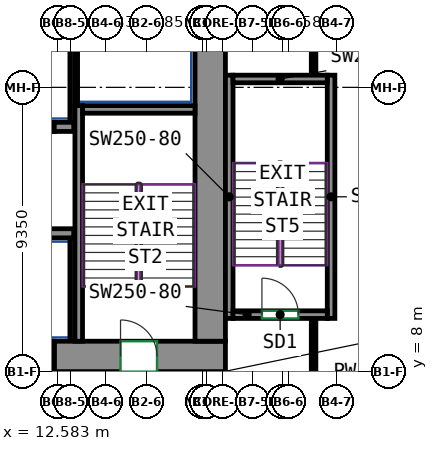
"""IFC4 building model, lengths in metres.
Left out: names, types, materials, properties, quantities, classifications, styles, units other than length and angle.
Written with IfcOpenShell. Run it as: python <this file> out.ifc"""

import sys

from ifc_helpers import new_model, si_unit, direction, frame, frame_2d, origin, place, context, subcontext, project, spatial, rectangle, extrude, source, transform, mapped, element, fill, save


model = new_model("IFC4")
c1 = context("Model", 3, precision=1e-05, world=origin(), true_north=direction((0.0, 1.0)))
c2 = subcontext(c1, "Body", "Model", "MODEL_VIEW")
j1 = project(units=[si_unit("LENGTHUNIT", "METRE"), si_unit("PLANEANGLEUNIT", "RADIAN")], contexts=[c1])
p1 = place(None, origin())
s1 = spatial("IfcSite", under=j1, at=p1, CompositionType="ELEMENT")
p2 = place(p1, origin())
s2 = spatial("IfcBuilding", under=s1, at=p2, CompositionType="ELEMENT")
p3 = place(p2, frame((0.0, 0.0, 13.5)))
s3 = spatial("IfcBuildingStorey", under=s2, at=p3, CompositionType="ELEMENT", Elevation=13.5)
m1 = source(origin(), c2, "Body", "SweptSolid", [
    extrude(rectangle(XDim=5.63, YDim=1.0, at=frame_2d((2.815, 0.0))), origin(), (0.0, 0.0, 1.0), 4.1),
])
p4 = place(p3, frame((12.47, 8.5, 0.0), z_axis=(0.0, 0.0, 1.0), x_axis=(1.0, 0.0, 0.0)))
e1 = element("IfcWall", 1, at=p4, inside=s3, PredefinedType="SHEAR", context=c2, shape_type="MappedRepresentation", body=[
    mapped(m1, transform((0.0, 0.0, 0.0))),
])
p5 = place(p4, frame((2.18, 0.0, 0.0)))
e2 = element("IfcOpeningElement", 2, at=p5, cuts=e1, PredefinedType="OPENING", context=c2, shape_type="SweptSolid", body=[
    extrude(rectangle(XDim=1.2, YDim=2.1, at=frame_2d((0.6, 1.05))), frame((0.0, 0.51, 0.0), z_axis=(0.0, -1.0, 0.0), x_axis=(1.0, 0.0, 0.0)), (0.0, 0.0, 1.0), 1.02),
])
m2 = source(origin(), c2, "Body", "SweptSolid", [
    extrude(rectangle(XDim=12.0, YDim=1.0, at=frame_2d((6.0, 0.0))), origin(), (0.0, 0.0, 1.0), 4.1),
])
p6 = place(p3, frame((17.6, 9.0, 0.0), z_axis=(0.0, 0.0, 1.0), x_axis=(0.0, 1.0, 0.0)))
e3 = element("IfcWall", 3, at=p6, inside=s3, PredefinedType="SHEAR", context=c2, shape_type="MappedRepresentation", body=[
    mapped(m2, transform((0.0, 0.0, 0.0))),
])
m3 = source(origin(), c2, "Body", "SweptSolid", [
    extrude(rectangle(XDim=7.75, YDim=0.25, at=frame_2d((3.875, 0.0))), origin(), (0.0, 0.0, 1.0), 4.1),
])
p7 = place(p3, frame((13.275, 9.0, 0.0), z_axis=(0.0, 0.0, 1.0), x_axis=(0.0, 1.0, 0.0)))
e4 = element("IfcWall", 4, at=p7, inside=s3, PredefinedType="SHEAR", context=c2, shape_type="MappedRepresentation", body=[
    mapped(m3, transform((0.0, 0.0, 0.0))),
])
m4 = source(origin(), c2, "Body", "SweptSolid", [
    extrude(rectangle(XDim=3.7, YDim=0.25, at=frame_2d((1.85, 0.0))), origin(), (0.0, 0.0, 1.0), 4.1),
])
p8 = place(p3, frame((13.4, 16.625, 0.0), z_axis=(0.0, 0.0, 1.0), x_axis=(1.0, 0.0, 0.0)))
e5 = element("IfcWall", 5, at=p8, inside=s3, PredefinedType="SHEAR", context=c2, shape_type="MappedRepresentation", body=[
    mapped(m4, transform((0.0, 0.0, 0.0))),
])
m5 = source(origin(), c2, "Body", "SweptSolid", [
    extrude(rectangle(XDim=8.0, YDim=0.25, at=frame_2d((4.0, 0.0))), origin(), (0.0, 0.0, 1.0), 4.1),
])
for number, where, z_axis, x_axis in (
    (6, (18.225, 9.75, 0.0), (0.0, 0.0, 1.0), (0.0, 1.0, 0.0)),
    (7, (21.575, 9.75, 0.0), (0.0, 0.0, 1.0), (0.0, 1.0, 0.0)),
):
    element("IfcWall", number, at=place(p3, frame(where, z_axis=z_axis, x_axis=x_axis)), inside=s3, PredefinedType="SHEAR", context=c2, shape_type="MappedRepresentation", body=[
        mapped(m5, transform((0.0, 0.0, 0.0))),
    ])
m6 = source(origin(), c2, "Body", "SweptSolid", [
    extrude(rectangle(XDim=3.1, YDim=0.25, at=frame_2d((1.55, 0.0))), origin(), (0.0, 0.0, 1.0), 4.1),
])
p9 = place(p3, frame((18.35, 9.875, 0.0), z_axis=(0.0, 0.0, 1.0), x_axis=(1.0, 0.0, 0.0)))
e8 = element("IfcWall", 8, at=p9, inside=s3, PredefinedType="SHEAR", context=c2, shape_type="MappedRepresentation", body=[
    mapped(m6, transform((0.0, 0.0, 0.0))),
])
p10 = place(p9, frame((0.95, 0.0, 0.0)))
e9 = element("IfcOpeningElement", 9, at=p10, cuts=e8, PredefinedType="OPENING", context=c2, shape_type="SweptSolid", body=[
    extrude(rectangle(XDim=1.2, YDim=2.1, at=frame_2d((0.6, 1.05))), frame((0.0, 0.135, 0.0), z_axis=(0.0, -1.0, 0.0), x_axis=(1.0, 0.0, 0.0)), (0.0, 0.0, 1.0), 0.27),
])
p11 = place(p3, frame((18.35, 17.625, 0.0), z_axis=(0.0, 0.0, 1.0), x_axis=(1.0, 0.0, 0.0)))
e10 = element("IfcWall", 10, at=p11, inside=s3, PredefinedType="SHEAR", context=c2, shape_type="MappedRepresentation", body=[
    mapped(m6, transform((0.0, 0.0, 0.0))),
])
m7 = source(origin(), c2, "Body", "SweptSolid", [
    extrude(rectangle(XDim=2.82, YDim=0.3, at=frame_2d((1.41, 0.0))), origin(), (0.0, 0.0, 1.0), 4.1),
])
p12 = place(p3, frame((10.29, 12.55, 0.0), z_axis=(0.0, 0.0, 1.0), x_axis=(1.0, 0.0, 0.0)))
e11 = element("IfcWall", 11, at=p12, inside=s3, PredefinedType="SHEAR", context=c2, shape_type="MappedRepresentation", body=[
    mapped(m7, transform((0.0, 0.0, 0.0))),
])
m8 = source(origin(), c2, "Body", "SweptSolid", [
    extrude(rectangle(XDim=0.64, YDim=0.3, at=frame_2d((0.32, 0.0))), origin(), (0.0, 0.0, 1.0), 4.1),
])
p13 = place(p3, frame((12.47, 16.05, 0.0), z_axis=(0.0, 0.0, 1.0), x_axis=(1.0, 0.0, 0.0)))
e12 = element("IfcWall", 12, at=p13, inside=s3, PredefinedType="SHEAR", context=c2, shape_type="MappedRepresentation", body=[
    mapped(m8, transform((0.0, 0.0, 0.0))),
])
m9 = source(origin(), c2, "Body", "SweptSolid", [
    extrude(rectangle(XDim=1.4, YDim=0.3, at=frame_2d((0.7, 0.0))), origin(), (0.0, 0.0, 1.0), 4.1),
])
p14 = place(p3, frame((11.07, 16.05, 0.0), z_axis=(0.0, 0.0, 1.0), x_axis=(1.0, 0.0, 0.0)))
e13 = element("IfcWall", 13, at=p14, inside=s3, PredefinedType="PARTITIONING", context=c2, shape_type="MappedRepresentation", body=[
    mapped(m9, transform((0.0, 0.0, 0.0))),
])
p15 = place(p14, frame((0.15, 0.0, 0.0)))
e14 = element("IfcOpeningElement", 14, at=p15, cuts=e13, PredefinedType="OPENING", context=c2, shape_type="SweptSolid", body=[
    extrude(rectangle(XDim=1.1, YDim=2.1, at=frame_2d((0.55, 1.05))), frame((0.0, 0.16, 0.0), z_axis=(0.0, -1.0, 0.0), x_axis=(1.0, 0.0, 0.0)), (0.0, 0.0, 1.0), 0.32),
])
m10 = source(origin(), c2, "Body", "SweptSolid", [
    extrude(rectangle(XDim=3.275, YDim=0.165, at=frame_2d((1.638, 0.0))), origin(), (0.0, 0.0, 1.0), 4.1),
])
p16 = place(p3, frame((13.067, 16.2, 0.0), z_axis=(0.0, 0.0, 1.0), x_axis=(0.0, 1.0, 0.0)))
e15 = element("IfcWall", 15, at=p16, inside=s3, PredefinedType="PARTITIONING", context=c2, shape_type="MappedRepresentation", body=[
    mapped(m10, transform((0.0, 0.0, 0.0))),
])
m11 = source(origin(), c2, "Body", "SweptSolid", [
    extrude(rectangle(XDim=2.725, YDim=0.085, at=frame_2d((1.363, 0.0))), origin(), (0.0, 0.0, 1.0), 4.1),
])
p17 = place(p3, frame((13.192, 16.75, 0.0), z_axis=(0.0, 0.0, 1.0), x_axis=(0.0, 1.0, 0.0)))
e16 = element("IfcWall", 16, at=p17, inside=s3, PredefinedType="PARTITIONING", context=c2, shape_type="MappedRepresentation", body=[
    mapped(m11, transform((0.0, 0.0, 0.0))),
])
m12 = source(origin(), c2, "Body", "SweptSolid", [
    extrude(rectangle(XDim=3.4, YDim=0.165, at=frame_2d((1.7, 0.0))), origin(), (0.0, 0.0, 1.0), 4.1),
])
p18 = place(p3, frame((13.067, 9.0, 0.0), z_axis=(0.0, 0.0, 1.0), x_axis=(0.0, 1.0, 0.0)))
e17 = element("IfcWall", 17, at=p18, inside=s3, PredefinedType="PARTITIONING", context=c2, shape_type="MappedRepresentation", body=[
    mapped(m12, transform((0.0, 0.0, 0.0))),
])
m13 = source(origin(), c2, "Body", "SweptSolid", [
    extrude(rectangle(XDim=1.4, YDim=1.0, at=frame_2d((0.7, 0.0))), origin(), (0.0, 0.0, 1.0), 2.7),
])
p19 = place(p3, frame((11.07, 8.5, 0.0), z_axis=(0.0, 0.0, 1.0), x_axis=(1.0, 0.0, 0.0)))
e18 = element("IfcWall", 18, at=p19, inside=s3, PredefinedType="PARTITIONING", context=c2, shape_type="MappedRepresentation", body=[
    mapped(m13, transform((0.0, 0.0, 0.0))),
])
p20 = place(p19, frame((0.25, 0.0, 0.0)))
e19 = element("IfcOpeningElement", 19, at=p20, cuts=e18, PredefinedType="OPENING", context=c2, shape_type="SweptSolid", body=[
    extrude(rectangle(XDim=0.9, YDim=2.1, at=frame_2d((0.45, 1.05))), frame((0.0, 0.51, 0.0), z_axis=(0.0, -1.0, 0.0), x_axis=(1.0, 0.0, 0.0)), (0.0, 0.0, 1.0), 1.02),
])
p21 = place(p3, frame((21.0, 17.75, 0.0), z_axis=(0.0, 0.0, 1.0), x_axis=(0.0, 1.0, 0.0)))
e20 = element("IfcWall", 20, at=p21, inside=s3, PredefinedType="PARTITIONING", context=c2, shape_type="SweptSolid", body=[
    extrude(rectangle(XDim=6.675, YDim=0.15, at=frame_2d((3.337, 0.0))), origin(), (0.0, 0.0, 1.0), 4.1),
])
p22 = place(p3, frame((21.0, 6.25, 0.0), z_axis=(0.0, 0.0, 1.0), x_axis=(0.0, 1.0, 0.0)))
e21 = element("IfcWall", 21, at=p22, inside=s3, PredefinedType="PARTITIONING", context=c2, shape_type="SweptSolid", body=[
    extrude(rectangle(XDim=3.5, YDim=0.15, at=frame_2d((1.75, 0.0))), origin(), (0.0, 0.0, 1.0), 4.1),
])
p23 = place(p5, origin())
e22 = element("IfcDoor", 22, at=p23, inside=s3, OperationType="DOUBLE_DOOR_SINGLE_SWING", PredefinedType="DOOR", context=c2, shape_type="SweptSolid", body=[
    extrude(rectangle(XDim=1.2, YDim=2.1, at=frame_2d((0.6, 1.05))), frame((0.0, 0.405, 0.0), z_axis=(0.0, -1.0, 0.0), x_axis=(1.0, 0.0, 0.0)), (0.0, 0.0, 1.0), 0.05),
])
fill(e2, e22)
p24 = place(p10, origin())
e23 = element("IfcDoor", 23, at=p24, inside=s3, OperationType="DOUBLE_DOOR_SINGLE_SWING", PredefinedType="DOOR", context=c2, shape_type="SweptSolid", body=[
    extrude(rectangle(XDim=1.2, YDim=2.1, at=frame_2d((0.6, 1.05))), frame((0.0, 0.025, 0.0), z_axis=(0.0, -1.0, 0.0), x_axis=(1.0, 0.0, 0.0)), (0.0, 0.0, 1.0), 0.05),
])
fill(e9, e23)
save(model, sys.argv[1])
